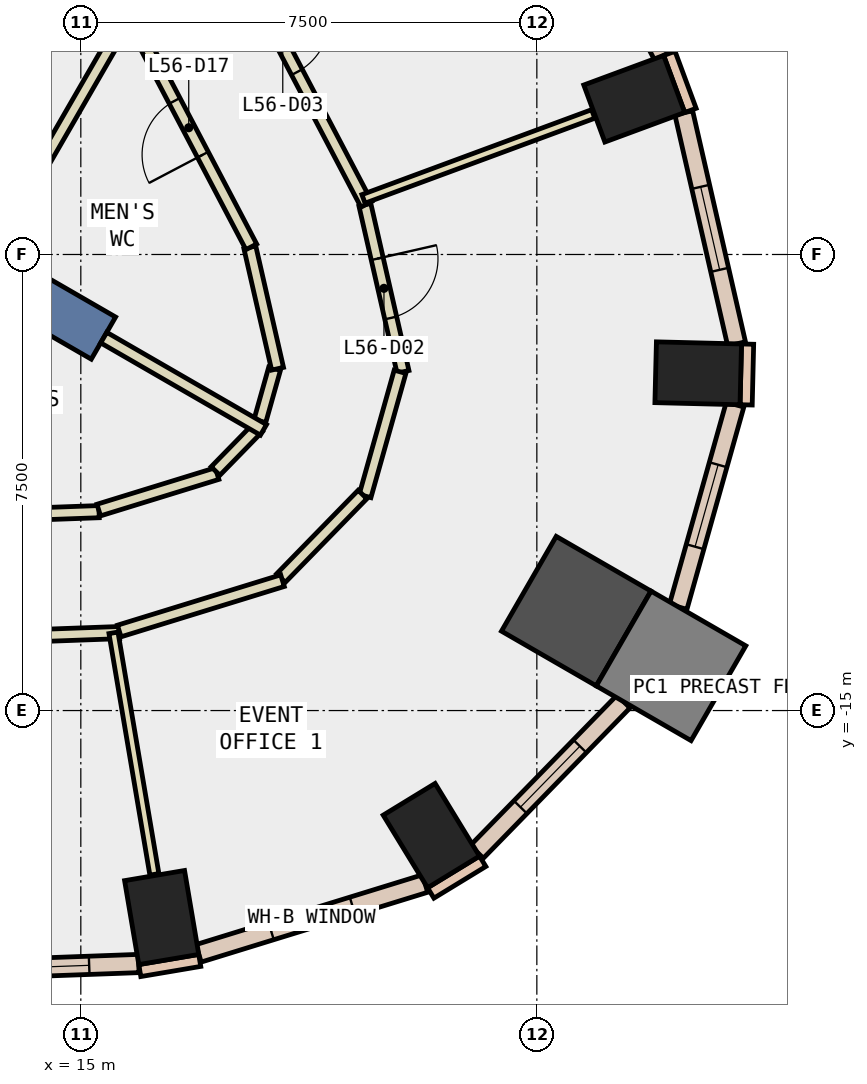
"""IFC4 building model, lengths in metres.
Left out: names, types, materials, properties, quantities, classifications, styles, units other than length and angle.
Written with IfcOpenShell. Run it as: python <this file> out.ifc"""

import sys

from ifc_helpers import new_model, si_unit, direction, frame, frame_2d, origin, origin_2d, place, context, subcontext, project, spatial, rectangle, extrude, element, fill, save


model = new_model("IFC4")
c1 = context("Model", 3, precision=1e-05, world=origin(), true_north=direction((0.0, 1.0)))
c2 = subcontext(c1, "Body", "Model", "MODEL_VIEW")
j1 = project(units=[si_unit("LENGTHUNIT", "METRE"), si_unit("PLANEANGLEUNIT", "RADIAN")], contexts=[c1])
p1 = place(None, origin())
s1 = spatial("IfcSite", under=j1, at=p1, CompositionType="ELEMENT")
p2 = place(p1, origin())
s2 = spatial("IfcBuilding", under=s1, at=p2, CompositionType="ELEMENT")
p3 = place(p2, frame((0.0, 0.0, 248.6)))
s3 = spatial("IfcBuildingStorey", under=s2, at=p3, CompositionType="ELEMENT", Elevation=248.6)
for number, where, z_axis, x_axis in (
    (1, (16.33, -18.404, -0.34), (0.0, 0.0, 1.0), (0.986, 0.167, 0.0)),
    (2, (20.765, -17.057, -0.34), (0.0, 0.0, 1.0), (0.853, 0.521, 0.0)),
):
    element("IfcColumn", number, at=place(p3, frame(where, z_axis=z_axis, x_axis=x_axis)), inside=s3, PredefinedType="COLUMN", context=c2, shape_type="SweptSolid", body=[
        extrude(rectangle(XDim=1.0, YDim=1.4, at=origin_2d()), origin(), (0.0, 0.0, 1.0), 3.6),
    ])
p4 = place(p3, frame((23.148, -13.365, -0.34), z_axis=(0.0, 0.0, 1.0), x_axis=(-0.866025403784, 0.5, 0.0)))
e3 = element("IfcColumn", 3, at=p4, inside=s3, PredefinedType="COLUMN", context=c2, shape_type="SweptSolid", body=[
    extrude(rectangle(XDim=1.8, YDim=1.8, at=origin_2d()), origin(), (0.0, 0.0, 1.0), 3.6),
])
for number, where, z_axis, x_axis in (
    (4, (25.154, -9.454, -0.34), (0.0, 0.0, 1.0), (0.025, 1.0, 0.0)),
    (5, (24.102, -4.939, -0.34), (0.0, 0.0, 1.0), (-0.347, 0.938, 0.0)),
):
    element("IfcColumn", number, at=place(p3, frame(where, z_axis=z_axis, x_axis=x_axis)), inside=s3, PredefinedType="COLUMN", context=c2, shape_type="SweptSolid", body=[
        extrude(rectangle(XDim=1.0, YDim=1.4, at=origin_2d()), origin(), (0.0, 0.0, 1.0), 3.6),
    ])
p5 = place(p3, frame((24.707, -14.265, -0.34), z_axis=(0.0, 0.0, 1.0), x_axis=(-0.866025403784, 0.5, 0.0)))
e6 = element("IfcColumn", 6, at=p5, inside=s3, PredefinedType="COLUMN", context=c2, shape_type="SweptSolid", body=[
    extrude(rectangle(XDim=1.8, YDim=1.8, at=origin_2d()), origin(), (0.0, 0.0, 1.0), 3.6),
])
p6 = place(p3, frame((7.578, -4.375, -0.34), z_axis=(0.0, 0.0, 1.0), x_axis=(0.866024315419, -0.5000018851, 0.0)))
e7 = element("IfcWall", 7, at=p6, inside=s3, PredefinedType="SHEAR", context=c2, shape_type="SweptSolid", body=[
    extrude(rectangle(XDim=9.0, YDim=0.8, at=frame_2d((4.5, 0.0))), origin(), (0.0, 0.0, 1.0), 3.6),
])
p7 = place(p3, frame((25.026, -5.131, 0.0), z_axis=(0.0, 0.0, 1.0), x_axis=(-0.346892928577, 0.937904737222, 0.0)))
e8 = element("IfcWall", 8, at=p7, inside=s3, PredefinedType="STANDARD", context=c2, shape_type="SweptSolid", body=[
    extrude(rectangle(XDim=1.0, YDim=0.2, at=frame_2d((0.5, 0.0))), origin(), (0.0, 0.0, 1.0), 3.26),
])
p8 = place(p3, frame((15.97, -19.276, 0.0), z_axis=(0.0, 0.0, 1.0), x_axis=(0.985961725342, 0.166971483074, 0.0)))
e9 = element("IfcWall", 9, at=p8, inside=s3, PredefinedType="STANDARD", context=c2, shape_type="SweptSolid", body=[
    extrude(rectangle(XDim=1.0, YDim=0.2, at=frame_2d((0.5, 0.0))), origin(), (0.0, 0.0, 1.0), 3.26),
])
p9 = place(p3, frame((20.755, -18.0, 0.0), z_axis=(0.0, 0.0, 1.0), x_axis=(0.853679739553, 0.520798331677, 0.0)))
e10 = element("IfcWall", 10, at=p9, inside=s3, PredefinedType="STANDARD", context=c2, shape_type="SweptSolid", body=[
    extrude(rectangle(XDim=1.0, YDim=0.2, at=frame_2d((0.5, 0.0))), origin(), (0.0, 0.0, 1.0), 3.26),
])
p10 = place(p3, frame((25.942, -9.973, 0.0), z_axis=(0.0, 0.0, 1.0), x_axis=(0.024192379573, 0.999707321555, 0.0)))
e11 = element("IfcWall", 11, at=p10, inside=s3, PredefinedType="STANDARD", context=c2, shape_type="SweptSolid", body=[
    extrude(rectangle(XDim=0.999, YDim=0.2, at=frame_2d((0.5, 0.0))), origin(), (0.0, 0.0, 1.0), 3.26),
])
p11 = place(p3, frame((8.296, -19.44, 0.0), z_axis=(0.0, 0.0, 1.0), x_axis=(0.999331753125, 0.036551979363, 0.0)))
e12 = element("IfcWall", 12, at=p11, inside=s3, PredefinedType="STANDARD", context=c2, shape_type="SweptSolid", body=[
    extrude(rectangle(XDim=7.661, YDim=0.3, at=frame_2d((3.831, 0.0))), origin(), (0.0, 0.0, 1.0), 3.26),
])
p12 = place(p11, frame((0.815, 0.0, 0.9)))
e13 = element("IfcOpeningElement", 13, at=p12, cuts=e12, PredefinedType="OPENING", context=c2, shape_type="SweptSolid", body=[
    extrude(rectangle(XDim=2.2, YDim=2.0, at=frame_2d((1.1, 1.0))), frame((0.0, 0.16, 0.0), z_axis=(0.0, -1.0, 0.0), x_axis=(1.0, 0.0, 0.0)), (0.0, 0.0, 1.0), 0.32),
])
p13 = place(p11, frame((4.646, 0.0, 0.9)))
e14 = element("IfcOpeningElement", 14, at=p13, cuts=e12, PredefinedType="OPENING", context=c2, shape_type="SweptSolid", body=[
    extrude(rectangle(XDim=2.2, YDim=2.0, at=frame_2d((1.1, 1.0))), frame((0.0, 0.16, 0.0), z_axis=(0.0, -1.0, 0.0), x_axis=(1.0, 0.0, 0.0)), (0.0, 0.0, 1.0), 0.32),
])
p14 = place(p3, frame((16.936, -18.993, 0.0), z_axis=(0.0, 0.0, 1.0), x_axis=(0.955646189569, 0.2945171648, 0.0)))
e15 = element("IfcWall", 15, at=p14, inside=s3, PredefinedType="STANDARD", context=c2, shape_type="SweptSolid", body=[
    extrude(rectangle(XDim=3.898, YDim=0.3, at=frame_2d((1.949, 0.0))), origin(), (0.0, 0.0, 1.0), 3.26),
])
p15 = place(p14, frame((1.249, 0.0, 0.9)))
e16 = element("IfcOpeningElement", 16, at=p15, cuts=e15, PredefinedType="OPENING", context=c2, shape_type="SweptSolid", body=[
    extrude(rectangle(XDim=1.4, YDim=2.0, at=frame_2d((0.7, 1.0))), frame((0.0, 0.16, 0.0), z_axis=(0.0, -1.0, 0.0), x_axis=(1.0, 0.0, 0.0)), (0.0, 0.0, 1.0), 0.32),
])
p16 = place(p3, frame((21.513, -17.324, 0.0), z_axis=(0.0, 0.0, 1.0), x_axis=(0.698394514831, 0.715713002294, 0.0)))
e17 = element("IfcWall", 17, at=p16, inside=s3, PredefinedType="STANDARD", context=c2, shape_type="SweptSolid", body=[
    extrude(rectangle(XDim=3.454, YDim=0.3, at=frame_2d((1.727, 0.0))), origin(), (0.0, 0.0, 1.0), 3.26),
])
p17 = place(p16, frame((1.027, 0.0, 0.9)))
e18 = element("IfcOpeningElement", 18, at=p17, cuts=e17, PredefinedType="OPENING", context=c2, shape_type="SweptSolid", body=[
    extrude(rectangle(XDim=1.4, YDim=2.0, at=frame_2d((0.7, 1.0))), frame((0.0, 0.16, 0.0), z_axis=(0.0, -1.0, 0.0), x_axis=(1.0, 0.0, 0.0)), (0.0, 0.0, 1.0), 0.32),
])
p18 = place(p3, frame((24.824, -13.295, 0.0), z_axis=(0.0, 0.0, 1.0), x_axis=(0.270837632743, 0.962625044703, 0.0)))
e19 = element("IfcWall", 19, at=p18, inside=s3, PredefinedType="STANDARD", context=c2, shape_type="SweptSolid", body=[
    extrude(rectangle(XDim=3.456, YDim=0.3, at=frame_2d((1.728, 0.0))), origin(), (0.0, 0.0, 1.0), 3.26),
])
p19 = place(p18, frame((1.028, 0.0, 0.9)))
e20 = element("IfcOpeningElement", 20, at=p19, cuts=e19, PredefinedType="OPENING", context=c2, shape_type="SweptSolid", body=[
    extrude(rectangle(XDim=1.4, YDim=2.0, at=frame_2d((0.7, 1.0))), frame((0.0, 0.16, 0.0), z_axis=(0.0, -1.0, 0.0), x_axis=(1.0, 0.0, 0.0)), (0.0, 0.0, 1.0), 0.32),
])
p20 = place(p3, frame((25.785, -8.97, 0.0), z_axis=(0.0, 0.0, 1.0), x_axis=(-0.222901327396, 0.974841011778, 0.0)))
e21 = element("IfcWall", 21, at=p20, inside=s3, PredefinedType="STANDARD", context=c2, shape_type="SweptSolid", body=[
    extrude(rectangle(XDim=3.898, YDim=0.3, at=frame_2d((1.949, 0.0))), origin(), (0.0, 0.0, 1.0), 3.26),
])
p21 = place(p20, frame((1.249, 0.0, 0.9)))
e22 = element("IfcOpeningElement", 22, at=p21, cuts=e21, PredefinedType="OPENING", context=c2, shape_type="SweptSolid", body=[
    extrude(rectangle(XDim=1.4, YDim=2.0, at=frame_2d((0.7, 1.0))), frame((0.0, 0.16, 0.0), z_axis=(0.0, -1.0, 0.0), x_axis=(1.0, 0.0, 0.0)), (0.0, 0.0, 1.0), 0.32),
])
p22 = place(p3, frame((24.57, -4.234, 0.0), z_axis=(0.0, 0.0, 1.0), x_axis=(-0.465228032148, 0.885190871001, 0.0)))
e23 = element("IfcWall", 23, at=p22, inside=s3, PredefinedType="STANDARD", context=c2, shape_type="SweptSolid", body=[
    extrude(rectangle(XDim=5.572, YDim=0.3, at=frame_2d((2.786, 0.0))), origin(), (0.0, 0.0, 1.0), 3.26),
])
p23 = place(p22, frame((0.693, 0.0, 0.9)))
e24 = element("IfcOpeningElement", 24, at=p23, cuts=e23, PredefinedType="OPENING", context=c2, shape_type="SweptSolid", body=[
    extrude(rectangle(XDim=1.4, YDim=2.0, at=frame_2d((0.7, 1.0))), frame((0.0, 0.16, 0.0), z_axis=(0.0, -1.0, 0.0), x_axis=(1.0, 0.0, 0.0)), (0.0, 0.0, 1.0), 0.32),
])
p24 = place(p22, frame((3.479, 0.0, 0.9)))
e25 = element("IfcOpeningElement", 25, at=p24, cuts=e23, PredefinedType="OPENING", context=c2, shape_type="SweptSolid", body=[
    extrude(rectangle(XDim=1.4, YDim=2.0, at=frame_2d((0.7, 1.0))), frame((0.0, 0.16, 0.0), z_axis=(0.0, -1.0, 0.0), x_axis=(1.0, 0.0, 0.0)), (0.0, 0.0, 1.0), 0.32),
])
p25 = place(p3, frame((11.077, -11.883, 0.0), z_axis=(0.0, 0.0, 1.0), x_axis=(0.999335333519, 0.036453959732, 0.0)))
e26 = element("IfcWall", 26, at=p25, inside=s3, PredefinedType="PARTITIONING", context=c2, shape_type="SweptSolid", body=[
    extrude(rectangle(XDim=4.226, YDim=0.2, at=frame_2d((2.113, 0.0))), origin(), (0.0, 0.0, 1.0), 3.26),
])
p26 = place(p25, frame((1.613, 0.0, 0.0)))
e27 = element("IfcOpeningElement", 27, at=p26, cuts=e26, PredefinedType="OPENING", context=c2, shape_type="SweptSolid", body=[
    extrude(rectangle(XDim=1.0, YDim=2.1, at=frame_2d((0.5, 1.05))), frame((0.0, 0.11, 0.0), z_axis=(0.0, -1.0, 0.0), x_axis=(1.0, 0.0, 0.0)), (0.0, 0.0, 1.0), 0.22),
])
p27 = place(p3, frame((15.295, -11.703, 0.0), z_axis=(0.0, 0.0, 1.0), x_axis=(0.95563113363, 0.294566013716, 0.0)))
e28 = element("IfcWall", 28, at=p27, inside=s3, PredefinedType="PARTITIONING", context=c2, shape_type="SweptSolid", body=[
    extrude(rectangle(XDim=2.036, YDim=0.2, at=frame_2d((1.018, 0.0))), origin(), (0.0, 0.0, 1.0), 3.26),
])
p28 = place(p3, frame((17.215, -11.061, 0.0), z_axis=(0.0, 0.0, 1.0), x_axis=(0.698527813511, 0.715582904877, 0.0)))
e29 = element("IfcWall", 29, at=p28, inside=s3, PredefinedType="PARTITIONING", context=c2, shape_type="SweptSolid", body=[
    extrude(rectangle(XDim=1.002, YDim=0.2, at=frame_2d((0.501, 0.0))), origin(), (0.0, 0.0, 1.0), 3.26),
])
p29 = place(p3, frame((17.945, -10.238, 0.0), z_axis=(0.0, 0.0, 1.0), x_axis=(0.270785141481, 0.962639811743, 0.0)))
e30 = element("IfcWall", 30, at=p29, inside=s3, PredefinedType="PARTITIONING", context=c2, shape_type="SweptSolid", body=[
    extrude(rectangle(XDim=0.894, YDim=0.2, at=frame_2d((0.447, 0.0))), origin(), (0.0, 0.0, 1.0), 3.26),
])
p30 = place(p3, frame((18.236, -9.379, 0.0), z_axis=(0.0, 0.0, 1.0), x_axis=(-0.222760041204, 0.974873306662, 0.0)))
e31 = element("IfcWall", 31, at=p30, inside=s3, PredefinedType="PARTITIONING", context=c2, shape_type="SweptSolid", body=[
    extrude(rectangle(XDim=2.047, YDim=0.2, at=frame_2d((1.024, 0.0))), origin(), (0.0, 0.0, 1.0), 3.26),
])
p31 = place(p3, frame((17.804, -7.374, 0.0), z_axis=(0.0, 0.0, 1.0), x_axis=(-0.465179971699, 0.885216128372, 0.0)))
e32 = element("IfcWall", 32, at=p31, inside=s3, PredefinedType="PARTITIONING", context=c2, shape_type="SweptSolid", body=[
    extrude(rectangle(XDim=4.424, YDim=0.2, at=frame_2d((2.212, 0.0))), origin(), (0.0, 0.0, 1.0), 3.26),
])
p32 = place(p31, frame((1.712, 0.0, 0.0)))
e33 = element("IfcOpeningElement", 33, at=p32, cuts=e32, PredefinedType="OPENING", context=c2, shape_type="SweptSolid", body=[
    extrude(rectangle(XDim=1.0, YDim=2.1, at=frame_2d((0.5, 1.05))), frame((0.0, 0.11, 0.0), z_axis=(0.0, -1.0, 0.0), x_axis=(1.0, 0.0, 0.0)), (0.0, 0.0, 1.0), 0.22),
])
p33 = place(p3, frame((15.636, -13.718, 0.0), z_axis=(0.0, 0.0, 1.0), x_axis=(-0.99933282306, -0.036522715615, 0.0)))
e34 = element("IfcWall", 34, at=p33, inside=s3, PredefinedType="PARTITIONING", context=c2, shape_type="SweptSolid", body=[
    extrude(rectangle(XDim=7.941, YDim=0.2, at=frame_2d((3.971, 0.0))), origin(), (0.0, 0.0, 1.0), 3.26),
])
p34 = place(p33, frame((3.471, 0.0, 0.0)))
e35 = element("IfcOpeningElement", 35, at=p34, cuts=e34, PredefinedType="OPENING", context=c2, shape_type="SweptSolid", body=[
    extrude(rectangle(XDim=1.0, YDim=2.1, at=frame_2d((0.5, 1.05))), frame((0.0, 0.11, 0.0), z_axis=(0.0, -1.0, 0.0), x_axis=(1.0, 0.0, 0.0)), (0.0, 0.0, 1.0), 0.22),
])
p35 = place(p3, frame((19.672, -6.683, 0.0), z_axis=(0.0, 0.0, 1.0), x_axis=(0.222523624687, -0.974927298036, 0.0)))
e36 = element("IfcWall", 36, at=p35, inside=s3, PredefinedType="PARTITIONING", context=c2, shape_type="SweptSolid", body=[
    extrude(rectangle(XDim=2.817, YDim=0.2, at=frame_2d((1.409, 0.0))), origin(), (0.0, 0.0, 1.0), 3.26),
])
p36 = place(p35, frame((0.909, 0.0, 0.0)))
e37 = element("IfcOpeningElement", 37, at=p36, cuts=e36, PredefinedType="OPENING", context=c2, shape_type="SweptSolid", body=[
    extrude(rectangle(XDim=1.0, YDim=2.1, at=frame_2d((0.5, 1.05))), frame((0.0, 0.11, 0.0), z_axis=(0.0, -1.0, 0.0), x_axis=(1.0, 0.0, 0.0)), (0.0, 0.0, 1.0), 0.22),
])
p37 = place(p3, frame((20.25, -9.429, 0.0), z_axis=(0.0, 0.0, 1.0), x_axis=(-0.270905475888, -0.962605954238, 0.0)))
e38 = element("IfcWall", 38, at=p37, inside=s3, PredefinedType="PARTITIONING", context=c2, shape_type="SweptSolid", body=[
    extrude(rectangle(XDim=2.122, YDim=0.2, at=frame_2d((1.061, 0.0))), origin(), (0.0, 0.0, 1.0), 3.26),
])
p38 = place(p3, frame((19.633, -11.447, 0.0), z_axis=(0.0, 0.0, 1.0), x_axis=(-0.698477855606, -0.715631668687, 0.0)))
e39 = element("IfcWall", 39, at=p38, inside=s3, PredefinedType="PARTITIONING", context=c2, shape_type="SweptSolid", body=[
    extrude(rectangle(XDim=1.921, YDim=0.2, at=frame_2d((0.961, 0.0))), origin(), (0.0, 0.0, 1.0), 3.26),
])
p39 = place(p3, frame((18.317, -12.864, 0.0), z_axis=(0.0, 0.0, 1.0), x_axis=(-0.955600342663, -0.294665887239, 0.0)))
e40 = element("IfcWall", 40, at=p39, inside=s3, PredefinedType="PARTITIONING", context=c2, shape_type="SweptSolid", body=[
    extrude(rectangle(XDim=2.81, YDim=0.2, at=frame_2d((1.405, 0.0))), origin(), (0.0, 0.0, 1.0), 3.26),
])
p40 = place(p3, frame((16.947, -1.443, 0.0), z_axis=(0.0, 0.0, 1.0), x_axis=(0.465133414481, -0.88524059257, 0.0)))
e41 = element("IfcWall", 41, at=p40, inside=s3, PredefinedType="PARTITIONING", context=c2, shape_type="SweptSolid", body=[
    extrude(rectangle(XDim=5.91, YDim=0.2, at=frame_2d((2.955, 0.0))), origin(), (0.0, 0.0, 1.0), 3.26),
])
p41 = place(p40, frame((2.455, 0.0, 0.0)))
e42 = element("IfcOpeningElement", 42, at=p41, cuts=e41, PredefinedType="OPENING", context=c2, shape_type="SweptSolid", body=[
    extrude(rectangle(XDim=1.0, YDim=2.1, at=frame_2d((0.5, 1.05))), frame((0.0, 0.11, 0.0), z_axis=(0.0, -1.0, 0.0), x_axis=(1.0, 0.0, 0.0)), (0.0, 0.0, 1.0), 0.22),
])
p42 = place(p3, frame((15.793, -3.546, 0.0), z_axis=(0.0, 0.0, 1.0), x_axis=(-0.500000064182, -0.866025366729, 0.0)))
e43 = element("IfcWall", 43, at=p42, inside=s3, PredefinedType="PARTITIONING", context=c2, shape_type="SweptSolid", body=[
    extrude(rectangle(XDim=4.06, YDim=0.2, at=frame_2d((2.03, 0.0))), origin(), (0.0, 0.0, 1.0), 3.26),
])
p43 = place(p3, frame((15.377, -8.867, 0.0), z_axis=(0.0, 0.0, 1.0), x_axis=(0.865965767548, -0.500103278768, 0.0)))
e44 = element("IfcWall", 44, at=p43, inside=s3, PredefinedType="PARTITIONING", context=c2, shape_type="SweptSolid", body=[
    extrude(rectangle(XDim=3.033, YDim=0.2, at=frame_2d((1.517, 0.0))), origin(), (0.0, 0.0, 1.0), 3.26),
])
p44 = place(p3, frame((15.537, -13.722, 0.0), z_axis=(0.0, 0.0, 1.0), x_axis=(0.167012380144, -0.985954798598, 0.0)))
e45 = element("IfcWall", 45, at=p44, inside=s3, PredefinedType="PARTITIONING", context=c2, shape_type="SweptSolid", body=[
    extrude(rectangle(XDim=4.029, YDim=0.15, at=frame_2d((2.014, 0.0))), origin(), (0.0, 0.0, 1.0), 3.26),
])
p45 = place(p3, frame((19.649, -6.586, 0.0), z_axis=(0.0, 0.0, 1.0), x_axis=(0.937935790958, 0.346808956114, 0.0)))
e46 = element("IfcWall", 46, at=p45, inside=s3, PredefinedType="PARTITIONING", context=c2, shape_type="SweptSolid", body=[
    extrude(rectangle(XDim=4.028, YDim=0.15, at=frame_2d((2.014, 0.0))), origin(), (0.0, 0.0, 1.0), 3.26),
])
p46 = place(p13, origin())
e47 = element("IfcWindow", 47, at=p46, inside=s3, PartitioningType="SINGLE_PANEL", PredefinedType="WINDOW", context=c2, shape_type="SweptSolid", body=[
    extrude(rectangle(XDim=2.2, YDim=2.0, at=frame_2d((1.1, 1.0))), frame((0.0, 0.03, 0.0), z_axis=(0.0, -1.0, 0.0), x_axis=(1.0, 0.0, 0.0)), (0.0, 0.0, 1.0), 0.06),
])
fill(e14, e47)
p47 = place(p15, origin())
e48 = element("IfcWindow", 48, at=p47, inside=s3, PartitioningType="SINGLE_PANEL", PredefinedType="WINDOW", context=c2, shape_type="SweptSolid", body=[
    extrude(rectangle(XDim=1.4, YDim=2.0, at=frame_2d((0.7, 1.0))), frame((0.0, 0.03, 0.0), z_axis=(0.0, -1.0, 0.0), x_axis=(1.0, 0.0, 0.0)), (0.0, 0.0, 1.0), 0.06),
])
fill(e16, e48)
p48 = place(p17, origin())
e49 = element("IfcWindow", 49, at=p48, inside=s3, PartitioningType="SINGLE_PANEL", PredefinedType="WINDOW", context=c2, shape_type="SweptSolid", body=[
    extrude(rectangle(XDim=1.4, YDim=2.0, at=frame_2d((0.7, 1.0))), frame((0.0, 0.03, 0.0), z_axis=(0.0, -1.0, 0.0), x_axis=(1.0, 0.0, 0.0)), (0.0, 0.0, 1.0), 0.06),
])
fill(e18, e49)
p49 = place(p19, origin())
e50 = element("IfcWindow", 50, at=p49, inside=s3, PartitioningType="SINGLE_PANEL", PredefinedType="WINDOW", context=c2, shape_type="SweptSolid", body=[
    extrude(rectangle(XDim=1.4, YDim=2.0, at=frame_2d((0.7, 1.0))), frame((0.0, 0.03, 0.0), z_axis=(0.0, -1.0, 0.0), x_axis=(1.0, 0.0, 0.0)), (0.0, 0.0, 1.0), 0.06),
])
fill(e20, e50)
p50 = place(p21, origin())
e51 = element("IfcWindow", 51, at=p50, inside=s3, PartitioningType="SINGLE_PANEL", PredefinedType="WINDOW", context=c2, shape_type="SweptSolid", body=[
    extrude(rectangle(XDim=1.4, YDim=2.0, at=frame_2d((0.7, 1.0))), frame((0.0, 0.03, 0.0), z_axis=(0.0, -1.0, 0.0), x_axis=(1.0, 0.0, 0.0)), (0.0, 0.0, 1.0), 0.06),
])
fill(e22, e51)
p51 = place(p36, origin())
e52 = element("IfcDoor", 52, at=p51, inside=s3, OperationType="SINGLE_SWING_LEFT", PredefinedType="DOOR", context=c2, shape_type="SweptSolid", body=[
    extrude(rectangle(XDim=1.0, YDim=2.1, at=frame_2d((0.5, 1.05))), frame((0.0, 0.025, 0.0), z_axis=(0.0, -1.0, 0.0), x_axis=(1.0, 0.0, 0.0)), (0.0, 0.0, 1.0), 0.05),
])
fill(e37, e52)
p52 = place(p41, origin())
e53 = element("IfcDoor", 53, at=p52, inside=s3, OperationType="SINGLE_SWING_LEFT", PredefinedType="DOOR", context=c2, shape_type="SweptSolid", body=[
    extrude(rectangle(XDim=1.0, YDim=2.1, at=frame_2d((0.5, 1.05))), frame((0.0, 0.025, 0.0), z_axis=(0.0, -1.0, 0.0), x_axis=(1.0, 0.0, 0.0)), (0.0, 0.0, 1.0), 0.05),
])
fill(e42, e53)
p53 = place(p32, origin())
e54 = element("IfcDoor", 54, at=p53, inside=s3, OperationType="SINGLE_SWING_LEFT", PredefinedType="DOOR", context=c2, shape_type="SweptSolid", body=[
    extrude(rectangle(XDim=1.0, YDim=2.1, at=frame_2d((0.5, 1.05))), frame((0.0, 0.025, 0.0), z_axis=(0.0, -1.0, 0.0), x_axis=(1.0, 0.0, 0.0)), (0.0, 0.0, 1.0), 0.05),
])
fill(e33, e54)
save(model, sys.argv[1])
